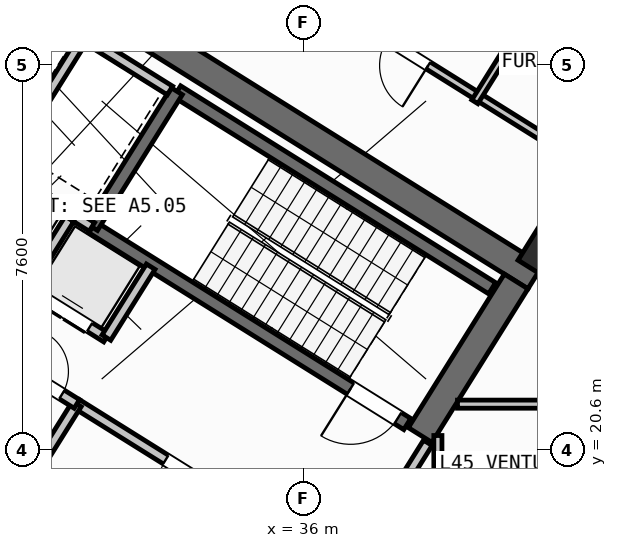
"""IFC4 building model, lengths in metres.
Left out: names, types, materials, properties, quantities, classifications, styles, units other than length and angle.
Written with IfcOpenShell. Run it as: python <this file> out.ifc"""

import sys

from ifc_helpers import new_model, si_unit, direction, frame, frame_2d, origin, origin_2d, place, context, subcontext, project, spatial, rectangle, hollow_rectangle, extrude, source, transform, mapped, element, fill, save


model = new_model("IFC4")
c1 = context("Model", 3, precision=1e-05, world=origin(), true_north=direction((0.0, 1.0)))
c2 = subcontext(c1, "Body", "Model", "MODEL_VIEW")
j1 = project(units=[si_unit("LENGTHUNIT", "METRE"), si_unit("PLANEANGLEUNIT", "RADIAN")], contexts=[c1])
p1 = place(None, origin())
s1 = spatial("IfcSite", under=j1, at=p1, CompositionType="ELEMENT")
p2 = place(p1, origin())
s2 = spatial("IfcBuilding", under=s1, at=p2, CompositionType="ELEMENT")
p3 = place(p2, frame((0.0, 0.0, 179.4)))
s3 = spatial("IfcBuildingStorey", under=s2, at=p3, CompositionType="ELEMENT", Elevation=179.4)
p4 = place(p3, frame((40.573, 24.01, 0.0), z_axis=(0.0, 0.0, 1.0), x_axis=(-0.848047359947, 0.529920442413, 0.0)))
e1 = element("IfcWall", 1, at=p4, inside=s3, PredefinedType="SHEAR", context=c2, shape_type="SweptSolid", body=[
    extrude(rectangle(XDim=13.14, YDim=0.55, at=frame_2d((6.57, 0.0))), origin(), (0.0, 0.0, 1.0), 4.55),
])
p5 = place(p3, frame((40.194, 23.922, 0.0), z_axis=(0.0, 0.0, 1.0), x_axis=(-0.529888438328, -0.848067357541, 0.0)))
e2 = element("IfcWall", 2, at=p5, inside=s3, PredefinedType="SHEAR", context=c2, shape_type="SweptSolid", body=[
    extrude(rectangle(XDim=3.575, YDim=0.55, at=frame_2d((1.788, 0.0))), origin(), (0.0, 0.0, 1.0), 4.55),
])
m1 = source(origin(), c2, "Body", "SweptSolid", [
    extrude(hollow_rectangle(XDim=0.8, YDim=0.8, WallThickness=0.032, at=origin_2d()), origin(), (0.0, 0.0, 1.0), 4.8),
])
p6 = place(p3, frame((40.783, 24.469, 0.0), z_axis=(0.0, 0.0, 1.0), x_axis=(-0.848048096156, 0.529919264233, 0.0)))
e3 = element("IfcColumn", 3, at=p6, inside=s3, PredefinedType="COLUMN", context=c2, shape_type="MappedRepresentation", body=[
    mapped(m1, transform((0.0, 0.0, 0.0), scale=1.0)),
])
p7 = place(p3, frame((31.76, 12.183, 0.0), z_axis=(0.0, 0.0, 1.0), x_axis=(-0.848047074256, 0.529920899612, 0.0)))
e4 = element("IfcWall", 4, at=p7, inside=s3, PredefinedType="STANDARD", context=c2, shape_type="SweptSolid", body=[
    extrude(rectangle(XDim=30.652, YDim=0.32, at=frame_2d((15.326, 0.0))), origin(), (0.0, 0.0, 1.0), 4.55),
])
p8 = place(p7, frame((21.52, 0.0, 0.0)))
e5 = element("IfcOpeningElement", 5, at=p8, cuts=e4, PredefinedType="OPENING", context=c2, shape_type="SweptSolid", body=[
    extrude(rectangle(XDim=1.2, YDim=2.15, at=frame_2d((0.6, 1.075))), frame((0.0, 0.17, 0.0), z_axis=(0.0, -1.0, 0.0), x_axis=(1.0, 0.0, 0.0)), (0.0, 0.0, 1.0), 0.34),
])
p9 = place(p7, frame((14.878, 0.0, 0.0)))
e6 = element("IfcOpeningElement", 6, at=p9, cuts=e4, PredefinedType="OPENING", context=c2, shape_type="SweptSolid", body=[
    extrude(rectangle(XDim=1.5, YDim=2.25, at=frame_2d((0.75, 1.125))), frame((0.0, 0.17, 0.0), z_axis=(0.0, -1.0, 0.0), x_axis=(1.0, 0.0, 0.0)), (0.0, 0.0, 1.0), 0.34),
])
p10 = place(p7, frame((1.865, 0.0, 0.75)))
e7 = element("IfcOpeningElement", 7, at=p10, cuts=e4, PredefinedType="OPENING", context=c2, shape_type="SweptSolid", body=[
    extrude(rectangle(XDim=2.4, YDim=1.6, at=frame_2d((1.2, 0.8))), frame((0.0, 0.17, 0.0), z_axis=(0.0, -1.0, 0.0), x_axis=(1.0, 0.0, 0.0)), (0.0, 0.0, 1.0), 0.34),
])
p11 = place(p7, frame((7.094, 0.0, 0.75)))
e8 = element("IfcOpeningElement", 8, at=p11, cuts=e4, PredefinedType="OPENING", context=c2, shape_type="SweptSolid", body=[
    extrude(rectangle(XDim=2.4, YDim=1.6, at=frame_2d((1.2, 0.8))), frame((0.0, 0.17, 0.0), z_axis=(0.0, -1.0, 0.0), x_axis=(1.0, 0.0, 0.0)), (0.0, 0.0, 1.0), 0.34),
])
p12 = place(p7, frame((19.404, 0.0, 0.95)))
e9 = element("IfcOpeningElement", 9, at=p12, cuts=e4, PredefinedType="OPENING", context=c2, shape_type="SweptSolid", body=[
    extrude(rectangle(XDim=1.2, YDim=1.4, at=frame_2d((0.6, 0.7))), frame((0.0, 0.17, 0.0), z_axis=(0.0, -1.0, 0.0), x_axis=(1.0, 0.0, 0.0)), (0.0, 0.0, 1.0), 0.34),
])
p13 = place(p7, frame((26.458, 0.0, 0.75)))
e10 = element("IfcOpeningElement", 10, at=p13, cuts=e4, PredefinedType="OPENING", context=c2, shape_type="SweptSolid", body=[
    extrude(rectangle(XDim=2.4, YDim=1.6, at=frame_2d((1.2, 0.8))), frame((0.0, 0.17, 0.0), z_axis=(0.0, -1.0, 0.0), x_axis=(1.0, 0.0, 0.0)), (0.0, 0.0, 1.0), 0.34),
])
p14 = place(p3, frame((31.28, 18.261, 0.0), z_axis=(0.0, 0.0, 1.0), x_axis=(-0.848051618787, 0.529913626805, 0.0)))
e11 = element("IfcWall", 11, at=p14, inside=s3, PredefinedType="SHEAR", context=c2, shape_type="SweptSolid", body=[
    extrude(rectangle(XDim=7.46, YDim=0.26, at=frame_2d((3.73, 0.0))), origin(), (0.0, 0.0, 1.0), 4.55),
])
p15 = place(p14, frame((0.36, 0.0, 0.0)))
e12 = element("IfcOpeningElement", 12, at=p15, cuts=e11, PredefinedType="OPENING", context=c2, shape_type="SweptSolid", body=[
    extrude(rectangle(XDim=0.86, YDim=2.05, at=frame_2d((0.43, 1.025))), frame((0.0, 0.14, 0.0), z_axis=(0.0, -1.0, 0.0), x_axis=(1.0, 0.0, 0.0)), (0.0, 0.0, 1.0), 0.28),
])
p16 = place(p3, frame((39.721, 23.788, 0.0), z_axis=(0.0, 0.0, 1.0), x_axis=(-0.848054434086, 0.529909121291, 0.0)))
e13 = element("IfcWall", 13, at=p16, inside=s3, PredefinedType="SHEAR", context=c2, shape_type="SweptSolid", body=[
    extrude(rectangle(XDim=7.33, YDim=0.26, at=frame_2d((3.665, 0.0))), origin(), (0.0, 0.0, 1.0), 4.55),
])
p17 = place(p3, frame((38.046, 21.108, 0.0), z_axis=(0.0, 0.0, 1.0), x_axis=(-0.848054434086, 0.529909121291, 0.0)))
e14 = element("IfcWall", 14, at=p17, inside=s3, PredefinedType="SHEAR", context=c2, shape_type="SweptSolid", body=[
    extrude(rectangle(XDim=7.33, YDim=0.26, at=frame_2d((3.665, 0.0))), origin(), (0.0, 0.0, 1.0), 4.55),
])
p18 = place(p17, frame((0.22, 0.0, 0.0)))
e15 = element("IfcOpeningElement", 15, at=p18, cuts=e14, PredefinedType="OPENING", context=c2, shape_type="SweptSolid", body=[
    extrude(rectangle(XDim=1.1, YDim=2.1, at=frame_2d((0.55, 1.05))), frame((0.0, 0.14, 0.0), z_axis=(0.0, -1.0, 0.0), x_axis=(1.0, 0.0, 0.0)), (0.0, 0.0, 1.0), 0.28),
])
p19 = place(p3, frame((33.496, 27.677, 0.0), z_axis=(0.0, 0.0, 1.0), x_axis=(-0.529908658664, -0.84805472316, 0.0)))
e16 = element("IfcWall", 16, at=p19, inside=s3, PredefinedType="SHEAR", context=c2, shape_type="SweptSolid", body=[
    extrude(rectangle(XDim=3.16, YDim=0.26, at=frame_2d((1.58, 0.0))), origin(), (0.0, 0.0, 1.0), 4.55),
])
p20 = place(p3, frame((36.417, 18.447, 0.0), z_axis=(0.0, 0.0, 1.0), x_axis=(-0.848064879198, 0.529892404805, 0.0)))
e17 = element("IfcWall", 17, at=p20, inside=s3, PredefinedType="STANDARD", context=c2, shape_type="SweptSolid", body=[
    extrude(rectangle(XDim=5.768, YDim=0.2, at=frame_2d((2.884, 0.0))), origin(), (0.0, 0.0, 1.0), 4.54),
])
p21 = place(p20, frame((2.548, 0.0, 0.0)))
e18 = element("IfcOpeningElement", 18, at=p21, cuts=e17, PredefinedType="OPENING", context=c2, shape_type="SweptSolid", body=[
    extrude(rectangle(XDim=1.15, YDim=2.1, at=frame_2d((0.575, 1.05))), frame((0.0, 0.11, 0.0), z_axis=(0.0, -1.0, 0.0), x_axis=(1.0, 0.0, 0.0)), (0.0, 0.0, 1.0), 0.22),
])
p22 = place(p3, frame((31.822, 24.998, 0.0), z_axis=(0.0, 0.0, 1.0), x_axis=(-0.848036912365, 0.52993716162, 0.0)))
e19 = element("IfcWall", 19, at=p22, inside=s3, PredefinedType="STANDARD", context=c2, shape_type="SweptSolid", body=[
    extrude(rectangle(XDim=4.618, YDim=0.2, at=frame_2d((2.309, 0.0))), origin(), (0.0, 0.0, 1.0), 4.54),
])
p23 = place(p3, frame((32.108, 22.814, 0.0), z_axis=(0.0, 0.0, 1.0), x_axis=(-0.848042229521, 0.529928652696, 0.0)))
e20 = element("IfcWall", 20, at=p23, inside=s3, PredefinedType="STANDARD", context=c2, shape_type="SweptSolid", body=[
    extrude(rectangle(XDim=5.62, YDim=0.2, at=frame_2d((2.81, 0.0))), origin(), (0.0, 0.0, 1.0), 4.54),
])
p24 = place(p23, frame((0.39, 0.0, 0.0)))
e21 = element("IfcOpeningElement", 21, at=p24, cuts=e20, PredefinedType="OPENING", context=c2, shape_type="SweptSolid", body=[
    extrude(rectangle(XDim=1.1, YDim=2.15, at=frame_2d((0.55, 1.075))), frame((0.0, 0.11, 0.0), z_axis=(0.0, -1.0, 0.0), x_axis=(1.0, 0.0, 0.0)), (0.0, 0.0, 1.0), 0.22),
])
p25 = place(p23, frame((2.25, 0.0, 0.0)))
e22 = element("IfcOpeningElement", 22, at=p25, cuts=e20, PredefinedType="OPENING", context=c2, shape_type="SweptSolid", body=[
    extrude(rectangle(XDim=1.1, YDim=2.15, at=frame_2d((0.55, 1.075))), frame((0.0, 0.11, 0.0), z_axis=(0.0, -1.0, 0.0), x_axis=(1.0, 0.0, 0.0)), (0.0, 0.0, 1.0), 0.22),
])
p26 = place(p23, frame((4.11, 0.0, 0.0)))
e23 = element("IfcOpeningElement", 23, at=p26, cuts=e20, PredefinedType="OPENING", context=c2, shape_type="SweptSolid", body=[
    extrude(rectangle(XDim=1.1, YDim=2.15, at=frame_2d((0.55, 1.075))), frame((0.0, 0.11, 0.0), z_axis=(0.0, -1.0, 0.0), x_axis=(1.0, 0.0, 0.0)), (0.0, 0.0, 1.0), 0.22),
])
p27 = place(p3, frame((32.982, 24.213, 0.0), z_axis=(0.0, 0.0, 1.0), x_axis=(-0.529839334948, -0.84809803628, 0.0)))
e24 = element("IfcWall", 24, at=p27, inside=s3, PredefinedType="STANDARD", context=c2, shape_type="SweptSolid", body=[
    extrude(rectangle(XDim=1.65, YDim=0.2, at=frame_2d((0.825, 0.0))), origin(), (0.0, 0.0, 1.0), 4.54),
])
p28 = place(p3, frame((31.645, 28.716, 0.0), z_axis=(0.0, 0.0, 1.0), x_axis=(-0.52986693015, -0.848080795876, 0.0)))
e25 = element("IfcWall", 25, at=p28, inside=s3, PredefinedType="STANDARD", context=c2, shape_type="SweptSolid", body=[
    extrude(rectangle(XDim=2.66, YDim=0.2, at=frame_2d((1.33, 0.0))), origin(), (0.0, 0.0, 1.0), 4.54),
])
p29 = place(p3, frame((33.363, 27.69, 0.0), z_axis=(0.0, 0.0, 1.0), x_axis=(-0.848047090064, 0.529920874315, 0.0)))
e26 = element("IfcWall", 26, at=p29, inside=s3, PredefinedType="STANDARD", context=c2, shape_type="SweptSolid", body=[
    extrude(rectangle(XDim=4.498, YDim=0.2, at=frame_2d((2.249, 0.0))), origin(), (0.0, 0.0, 1.0), 4.54),
])
p30 = place(p3, frame((31.379, 25.156, 0.0), z_axis=(0.0, 0.0, 1.0), x_axis=(-0.529998940003, -0.847998304005, 0.0)))
e27 = element("IfcWall", 27, at=p30, inside=s3, PredefinedType="STANDARD", context=c2, shape_type="SweptSolid", body=[
    extrude(rectangle(XDim=1.58, YDim=0.2, at=frame_2d((0.79, 0.0))), origin(), (0.0, 0.0, 1.0), 4.54),
])
p31 = place(p3, frame((31.525, 21.504, 0.0), z_axis=(0.0, 0.0, 1.0), x_axis=(-0.529907497854, -0.848055448493, 0.0)))
e28 = element("IfcWall", 28, at=p31, inside=s3, PredefinedType="STANDARD", context=c2, shape_type="SweptSolid", body=[
    extrude(rectangle(XDim=2.88, YDim=0.2, at=frame_2d((1.44, 0.0))), origin(), (0.0, 0.0, 1.0), 4.54),
])
p32 = place(p3, frame((31.525, 21.504, 0.0), z_axis=(0.0, 0.0, 1.0), x_axis=(-0.848040211232, 0.529931882541, 0.0)))
e29 = element("IfcWall", 29, at=p32, inside=s3, PredefinedType="STANDARD", context=c2, shape_type="SweptSolid", body=[
    extrude(rectangle(XDim=6.218, YDim=0.2, at=frame_2d((3.109, 0.0))), origin(), (0.0, 0.0, 1.0), 4.54),
])
p33 = place(p32, frame((4.4, 0.0, 0.0)))
e30 = element("IfcOpeningElement", 30, at=p33, cuts=e29, PredefinedType="OPENING", context=c2, shape_type="SweptSolid", body=[
    extrude(rectangle(XDim=0.86, YDim=2.05, at=frame_2d((0.43, 1.025))), frame((0.0, 0.11, 0.0), z_axis=(0.0, -1.0, 0.0), x_axis=(1.0, 0.0, 0.0)), (0.0, 0.0, 1.0), 0.22),
])
p34 = place(p32, frame((0.35, 0.0, 0.0)))
e31 = element("IfcOpeningElement", 31, at=p34, cuts=e29, PredefinedType="OPENING", context=c2, shape_type="SweptSolid", body=[
    extrude(rectangle(XDim=0.86, YDim=2.05, at=frame_2d((0.43, 1.025))), frame((0.0, 0.11, 0.0), z_axis=(0.0, -1.0, 0.0), x_axis=(1.0, 0.0, 0.0)), (0.0, 0.0, 1.0), 0.22),
])
p35 = place(p3, frame((31.239, 38.274, 0.0), z_axis=(0.0, 0.0, 1.0), x_axis=(-0.529921796515, -0.848046513806, 0.0)))
e32 = element("IfcWall", 32, at=p35, inside=s3, PredefinedType="PARTITIONING", context=c2, shape_type="SweptSolid", body=[
    extrude(rectangle(XDim=16.5, YDim=0.16, at=frame_2d((8.25, 0.0))), origin(), (0.0, 0.0, 1.0), 4.54),
])
p36 = place(p3, frame((41.936, 26.012, 0.0), z_axis=(0.0, 0.0, 1.0), x_axis=(-0.848051154596, 0.529914369676, 0.0)))
e33 = element("IfcWall", 33, at=p36, inside=s3, PredefinedType="PARTITIONING", context=c2, shape_type="SweptSolid", body=[
    extrude(rectangle(XDim=15.57, YDim=0.16, at=frame_2d((7.785, 0.0))), origin(), (0.0, 0.0, 1.0), 4.54),
])
p37 = place(p36, frame((4.1, 0.0, 0.0)))
e34 = element("IfcOpeningElement", 34, at=p37, cuts=e33, PredefinedType="OPENING", context=c2, shape_type="SweptSolid", body=[
    extrude(rectangle(XDim=0.96, YDim=2.08, at=frame_2d((0.48, 1.04))), frame((0.0, 0.09, 0.0), z_axis=(0.0, -1.0, 0.0), x_axis=(1.0, 0.0, 0.0)), (0.0, 0.0, 1.0), 0.18),
])
p38 = place(p36, frame((8.2, 0.0, 0.0)))
e35 = element("IfcOpeningElement", 35, at=p38, cuts=e33, PredefinedType="OPENING", context=c2, shape_type="SweptSolid", body=[
    extrude(rectangle(XDim=1.7, YDim=2.2, at=frame_2d((0.85, 1.1))), frame((0.0, 0.09, 0.0), z_axis=(0.0, -1.0, 0.0), x_axis=(1.0, 0.0, 0.0)), (0.0, 0.0, 1.0), 0.18),
])
p39 = place(p3, frame((40.512, 29.281, 0.0), z_axis=(0.0, 0.0, 1.0), x_axis=(-0.529947607416, -0.848030384712, 0.0)))
e36 = element("IfcWall", 36, at=p39, inside=s3, PredefinedType="PLUMBINGWALL", context=c2, shape_type="SweptSolid", body=[
    extrude(rectangle(XDim=2.138, YDim=0.14, at=frame_2d((1.069, 0.0))), origin(), (0.0, 0.0, 1.0), 4.54),
])
p40 = place(p3, frame((38.451, 20.737, 0.0), z_axis=(0.0, 0.0, 1.0), x_axis=(-0.529924799939, -0.848044637038, 0.0)))
e37 = element("IfcWall", 37, at=p40, inside=s3, PredefinedType="STANDARD", context=c2, shape_type="SweptSolid", body=[
    extrude(rectangle(XDim=2.96, YDim=0.2, at=frame_2d((1.48, 0.0))), origin(), (0.0, 0.0, 1.0), 4.54),
])
p41 = place(p40, frame((1.46, 0.0, 0.0)))
e38 = element("IfcOpeningElement", 38, at=p41, cuts=e37, PredefinedType="OPENING", context=c2, shape_type="SweptSolid", body=[
    extrude(rectangle(XDim=0.86, YDim=2.05, at=frame_2d((0.43, 1.025))), frame((0.0, 0.11, 0.0), z_axis=(0.0, -1.0, 0.0), x_axis=(1.0, 0.0, 0.0)), (0.0, 0.0, 1.0), 0.22),
])
p42 = place(p3, frame((38.65, 17.93, 0.0), z_axis=(0.0, 0.0, 1.0), x_axis=(0.0, 1.0, 0.0)))
e39 = element("IfcWall", 39, at=p42, inside=s3, PredefinedType="PARTITIONING", context=c2, shape_type="SweptSolid", body=[
    extrude(rectangle(XDim=2.951, YDim=0.16, at=frame_2d((1.476, 0.0))), origin(), (0.0, 0.0, 1.0), 4.54),
])
p43 = place(p3, frame((39.037, 21.5, 0.0), z_axis=(0.0, 0.0, 1.0), x_axis=(1.0, 0.0, 0.0)))
e40 = element("IfcWall", 40, at=p43, inside=s3, PredefinedType="PARTITIONING", context=c2, shape_type="SweptSolid", body=[
    extrude(rectangle(XDim=7.215, YDim=0.16, at=frame_2d((3.607, 0.0))), origin(), (0.0, 0.0, 1.0), 4.54),
])
m2 = source(origin(), c2, "Body", "SweptSolid", [
    extrude(rectangle(XDim=1.1, YDim=2.1, at=frame_2d((0.55, 1.05))), frame((0.0, 0.025, 0.0), z_axis=(0.0, -1.0, 0.0), x_axis=(1.0, 0.0, 0.0)), (0.0, 0.0, 1.0), 0.05),
])
p44 = place(p18, origin())
e41 = element("IfcDoor", 41, at=p44, inside=s3, OperationType="SINGLE_SWING_RIGHT", PredefinedType="DOOR", context=c2, shape_type="MappedRepresentation", body=[
    mapped(m2, transform((0.0, 0.0, 0.0), scale=1.0)),
])
fill(e15, e41)
m3 = source(origin(), c2, "Body", "SweptSolid", [
    extrude(rectangle(XDim=1.15, YDim=2.1, at=frame_2d((0.575, 1.05))), frame((0.0, 0.025, 0.0), z_axis=(0.0, -1.0, 0.0), x_axis=(1.0, 0.0, 0.0)), (0.0, 0.0, 1.0), 0.05),
])
p45 = place(p21, origin())
e42 = element("IfcDoor", 42, at=p45, inside=s3, OperationType="SINGLE_SWING_LEFT", PredefinedType="DOOR", context=c2, shape_type="MappedRepresentation", body=[
    mapped(m3, transform((0.0, 0.0, 0.0), scale=1.0)),
])
fill(e18, e42)
m4 = source(origin(), c2, "Body", "SweptSolid", [
    extrude(rectangle(XDim=1.1, YDim=2.15, at=frame_2d((0.55, 1.075))), frame((0.0, 0.025, 0.0), z_axis=(0.0, -1.0, 0.0), x_axis=(1.0, 0.0, 0.0)), (0.0, 0.0, 1.0), 0.05),
])
p46 = place(p24, origin())
e43 = element("IfcDoor", 43, at=p46, inside=s3, OperationType="DOUBLE_DOOR_SLIDING", PredefinedType="DOOR", context=c2, shape_type="MappedRepresentation", body=[
    mapped(m4, transform((0.0, 0.0, 0.0), scale=1.0)),
])
fill(e21, e43)
m5 = source(origin(), c2, "Body", "SweptSolid", [
    extrude(rectangle(XDim=0.86, YDim=2.05, at=frame_2d((0.43, 1.025))), frame((0.0, 0.025, 0.0), z_axis=(0.0, -1.0, 0.0), x_axis=(1.0, 0.0, 0.0)), (0.0, 0.0, 1.0), 0.05),
])
p47 = place(p34, frame((0.86, 0.0, 0.0), z_axis=(0.0, 0.0, 1.0), x_axis=(-1.0, 0.0, 0.0)))
e44 = element("IfcDoor", 44, at=p47, inside=s3, OperationType="SINGLE_SWING_LEFT", PredefinedType="DOOR", context=c2, shape_type="MappedRepresentation", body=[
    mapped(m5, transform((0.0, 0.0, 0.0), scale=1.0)),
])
fill(e31, e44)
m6 = source(origin(), c2, "Body", "SweptSolid", [
    extrude(rectangle(XDim=0.96, YDim=2.08, at=frame_2d((0.48, 1.04))), frame((0.0, 0.025, 0.0), z_axis=(0.0, -1.0, 0.0), x_axis=(1.0, 0.0, 0.0)), (0.0, 0.0, 1.0), 0.05),
])
p48 = place(p37, origin())
e45 = element("IfcDoor", 45, at=p48, inside=s3, OperationType="SINGLE_SWING_LEFT", PredefinedType="DOOR", context=c2, shape_type="MappedRepresentation", body=[
    mapped(m6, transform((0.0, 0.0, 0.0), scale=1.0)),
])
fill(e34, e45)
save(model, sys.argv[1])
